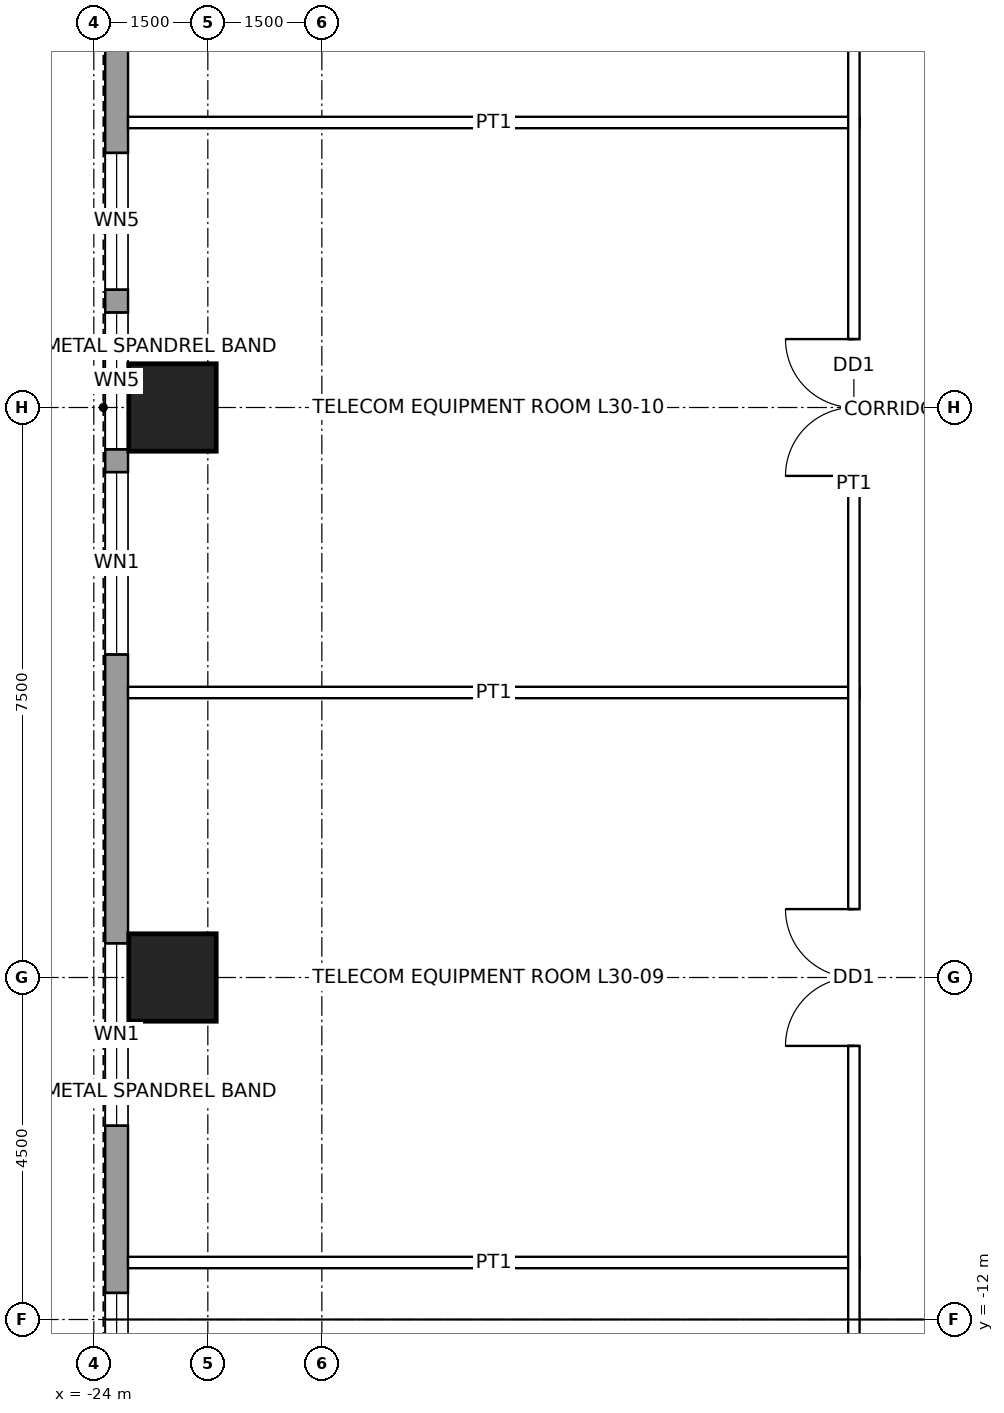
"""IFC4 building model, lengths in metres.
Left out: names, types, materials, properties, quantities, classifications, styles, units other than length and angle.
Written with IfcOpenShell. Run it as: python <this file> out.ifc"""

import sys

from ifc_helpers import new_model, si_unit, direction, frame, frame_2d, origin, origin_2d, place, context, subcontext, project, spatial, rectangle, hollow_rectangle, extrude, element, fill, save


model = new_model("IFC4")
c1 = context("Model", 3, precision=1e-05, world=origin(), true_north=direction((0.0, 1.0)))
c2 = subcontext(c1, "Body", "Model", "MODEL_VIEW")
j1 = project(units=[si_unit("LENGTHUNIT", "METRE"), si_unit("PLANEANGLEUNIT", "RADIAN")], contexts=[c1])
p1 = place(None, origin())
s1 = spatial("IfcSite", under=j1, at=p1, CompositionType="ELEMENT")
p2 = place(p1, origin())
s2 = spatial("IfcBuilding", under=s1, at=p2, CompositionType="ELEMENT")
p3 = place(p2, frame((0.0, 0.0, 149.4)))
s3 = spatial("IfcBuildingStorey", under=s2, at=p3, CompositionType="ELEMENT", Elevation=149.4)
for number, where, z_axis, x_axis in (
    (1, (-22.965, -7.5, 0.0), (0.0, 0.0, 1.0), (1.0, 0.0, 0.0)),
    (2, (-22.965, 0.0, 0.0), (0.0, 0.0, 1.0), (1.0, 0.0, 0.0)),
):
    element("IfcColumn", number, at=place(p3, frame(where, z_axis=z_axis, x_axis=x_axis)), inside=s3, PredefinedType="COLUMN", context=c2, shape_type="SweptSolid", body=[
        extrude(hollow_rectangle(XDim=1.15, YDim=1.15, WallThickness=0.075, at=origin_2d()), origin(), (0.0, 0.0, 1.0), 4.5),
    ])
p4 = place(p3, frame((-23.7, -16.2, 0.0), z_axis=(0.0, 0.0, 1.0), x_axis=(0.0, 1.0, 0.0)))
e3 = element("IfcWall", 3, at=p4, inside=s3, PredefinedType="SOLIDWALL", context=c2, shape_type="SweptSolid", body=[
    extrude(rectangle(XDim=32.4, YDim=0.3, at=frame_2d((16.2, 0.0))), origin(), (0.0, 0.0, 1.0), 4.3),
])
p5 = place(p4, frame((0.65, 0.0, 1.0)))
e4 = element("IfcOpeningElement", 4, at=p5, cuts=e3, PredefinedType="OPENING", context=c2, shape_type="SweptSolid", body=[
    extrude(rectangle(XDim=1.8, YDim=1.2, at=frame_2d((0.9, 0.6))), frame((0.0, 0.16, 0.0), z_axis=(0.0, -1.0, 0.0), x_axis=(1.0, 0.0, 0.0)), (0.0, 0.0, 1.0), 0.32),
])
p6 = place(p4, frame((2.75, 0.0, 1.0)))
e5 = element("IfcOpeningElement", 5, at=p6, cuts=e3, PredefinedType="OPENING", context=c2, shape_type="SweptSolid", body=[
    extrude(rectangle(XDim=1.8, YDim=1.2, at=frame_2d((0.9, 0.6))), frame((0.0, 0.16, 0.0), z_axis=(0.0, -1.0, 0.0), x_axis=(1.0, 0.0, 0.0)), (0.0, 0.0, 1.0), 0.32),
])
p7 = place(p4, frame((6.75, 0.0, 1.0)))
e6 = element("IfcOpeningElement", 6, at=p7, cuts=e3, PredefinedType="OPENING", context=c2, shape_type="SweptSolid", body=[
    extrude(rectangle(XDim=2.4, YDim=1.2, at=frame_2d((1.2, 0.6))), frame((0.0, 0.16, 0.0), z_axis=(0.0, -1.0, 0.0), x_axis=(1.0, 0.0, 0.0)), (0.0, 0.0, 1.0), 0.32),
])
p8 = place(p4, frame((12.95, 0.0, 1.0)))
e7 = element("IfcOpeningElement", 7, at=p8, cuts=e3, PredefinedType="OPENING", context=c2, shape_type="SweptSolid", body=[
    extrude(rectangle(XDim=2.4, YDim=1.2, at=frame_2d((1.2, 0.6))), frame((0.0, 0.16, 0.0), z_axis=(0.0, -1.0, 0.0), x_axis=(1.0, 0.0, 0.0)), (0.0, 0.0, 1.0), 0.32),
])
p9 = place(p4, frame((15.65, 0.0, 1.0)))
e8 = element("IfcOpeningElement", 8, at=p9, cuts=e3, PredefinedType="OPENING", context=c2, shape_type="SweptSolid", body=[
    extrude(rectangle(XDim=1.8, YDim=1.2, at=frame_2d((0.9, 0.6))), frame((0.0, 0.16, 0.0), z_axis=(0.0, -1.0, 0.0), x_axis=(1.0, 0.0, 0.0)), (0.0, 0.0, 1.0), 0.32),
])
p10 = place(p4, frame((17.75, 0.0, 1.0)))
e9 = element("IfcOpeningElement", 9, at=p10, cuts=e3, PredefinedType="OPENING", context=c2, shape_type="SweptSolid", body=[
    extrude(rectangle(XDim=1.8, YDim=1.2, at=frame_2d((0.9, 0.6))), frame((0.0, 0.16, 0.0), z_axis=(0.0, -1.0, 0.0), x_axis=(1.0, 0.0, 0.0)), (0.0, 0.0, 1.0), 0.32),
])
p11 = place(p4, frame((24.5, 0.0, 1.0)))
e10 = element("IfcOpeningElement", 10, at=p11, cuts=e3, PredefinedType="OPENING", context=c2, shape_type="SweptSolid", body=[
    extrude(rectangle(XDim=2.4, YDim=1.2, at=frame_2d((1.2, 0.6))), frame((0.0, 0.16, 0.0), z_axis=(0.0, -1.0, 0.0), x_axis=(1.0, 0.0, 0.0)), (0.0, 0.0, 1.0), 0.32),
])
p12 = place(p4, frame((28.0, 0.0, 1.0)))
e11 = element("IfcOpeningElement", 11, at=p12, cuts=e3, PredefinedType="OPENING", context=c2, shape_type="SweptSolid", body=[
    extrude(rectangle(XDim=2.4, YDim=1.2, at=frame_2d((1.2, 0.6))), frame((0.0, 0.16, 0.0), z_axis=(0.0, -1.0, 0.0), x_axis=(1.0, 0.0, 0.0)), (0.0, 0.0, 1.0), 0.32),
])
for number, where, z_axis, x_axis in (
    (12, (-23.55, -11.25, 0.0), (0.0, 0.0, 1.0), (1.0, 0.0, 0.0)),
    (13, (-23.55, -3.75, 0.0), (0.0, 0.0, 1.0), (1.0, 0.0, 0.0)),
    (14, (-23.55, 3.75, 0.0), (0.0, 0.0, 1.0), (1.0, 0.0, 0.0)),
):
    element("IfcWall", number, at=place(p3, frame(where, z_axis=z_axis, x_axis=x_axis)), inside=s3, PredefinedType="PARTITIONING", context=c2, shape_type="SweptSolid", body=[
        extrude(rectangle(XDim=9.625, YDim=0.15, at=frame_2d((4.812, 0.0))), origin(), (0.0, 0.0, 1.0), 3.431),
    ])
p13 = place(p3, frame((-14.0, -14.075, 0.0), z_axis=(0.0, 0.0, 1.0), x_axis=(0.0, 1.0, 0.0)))
e15 = element("IfcWall", 15, at=p13, inside=s3, PredefinedType="PARTITIONING", context=c2, shape_type="SweptSolid", body=[
    extrude(rectangle(XDim=26.15, YDim=0.15, at=frame_2d((13.075, 0.0))), origin(), (0.0, 0.0, 1.0), 4.3),
])
p14 = place(p13, frame((5.675, 0.0, 0.0)))
e16 = element("IfcOpeningElement", 16, at=p14, cuts=e15, PredefinedType="OPENING", context=c2, shape_type="SweptSolid", body=[
    extrude(rectangle(XDim=1.8, YDim=2.4, at=frame_2d((0.9, 1.2))), frame((0.0, 0.085, 0.0), z_axis=(0.0, -1.0, 0.0), x_axis=(1.0, 0.0, 0.0)), (0.0, 0.0, 1.0), 0.17),
])
p15 = place(p13, frame((13.175, 0.0, 0.0)))
e17 = element("IfcOpeningElement", 17, at=p15, cuts=e15, PredefinedType="OPENING", context=c2, shape_type="SweptSolid", body=[
    extrude(rectangle(XDim=1.8, YDim=2.4, at=frame_2d((0.9, 1.2))), frame((0.0, 0.085, 0.0), z_axis=(0.0, -1.0, 0.0), x_axis=(1.0, 0.0, 0.0)), (0.0, 0.0, 1.0), 0.17),
])
p16 = place(p13, frame((20.675, 0.0, 0.0)))
e18 = element("IfcOpeningElement", 18, at=p16, cuts=e15, PredefinedType="OPENING", context=c2, shape_type="SweptSolid", body=[
    extrude(rectangle(XDim=1.8, YDim=2.4, at=frame_2d((0.9, 1.2))), frame((0.0, 0.085, 0.0), z_axis=(0.0, -1.0, 0.0), x_axis=(1.0, 0.0, 0.0)), (0.0, 0.0, 1.0), 0.17),
])
p17 = place(p6, origin())
e19 = element("IfcWindow", 19, at=p17, inside=s3, PartitioningType="SINGLE_PANEL", PredefinedType="WINDOW", context=c2, shape_type="SweptSolid", body=[
    extrude(rectangle(XDim=1.8, YDim=1.2, at=frame_2d((0.9, 0.6))), frame((0.0, 0.03, 0.0), z_axis=(0.0, -1.0, 0.0), x_axis=(1.0, 0.0, 0.0)), (0.0, 0.0, 1.0), 0.06),
])
fill(e5, e19)
p18 = place(p7, origin())
e20 = element("IfcWindow", 20, at=p18, inside=s3, PartitioningType="SINGLE_PANEL", PredefinedType="WINDOW", context=c2, shape_type="SweptSolid", body=[
    extrude(rectangle(XDim=2.4, YDim=1.2, at=frame_2d((1.2, 0.6))), frame((0.0, 0.03, 0.0), z_axis=(0.0, -1.0, 0.0), x_axis=(1.0, 0.0, 0.0)), (0.0, 0.0, 1.0), 0.06),
])
fill(e6, e20)
p19 = place(p8, origin())
e21 = element("IfcWindow", 21, at=p19, inside=s3, PartitioningType="SINGLE_PANEL", PredefinedType="WINDOW", context=c2, shape_type="SweptSolid", body=[
    extrude(rectangle(XDim=2.4, YDim=1.2, at=frame_2d((1.2, 0.6))), frame((0.0, 0.03, 0.0), z_axis=(0.0, -1.0, 0.0), x_axis=(1.0, 0.0, 0.0)), (0.0, 0.0, 1.0), 0.06),
])
fill(e7, e21)
p20 = place(p9, origin())
e22 = element("IfcWindow", 22, at=p20, inside=s3, PartitioningType="SINGLE_PANEL", PredefinedType="WINDOW", context=c2, shape_type="SweptSolid", body=[
    extrude(rectangle(XDim=1.8, YDim=1.2, at=frame_2d((0.9, 0.6))), frame((0.0, 0.03, 0.0), z_axis=(0.0, -1.0, 0.0), x_axis=(1.0, 0.0, 0.0)), (0.0, 0.0, 1.0), 0.06),
])
fill(e8, e22)
p21 = place(p10, origin())
e23 = element("IfcWindow", 23, at=p21, inside=s3, PartitioningType="SINGLE_PANEL", PredefinedType="WINDOW", context=c2, shape_type="SweptSolid", body=[
    extrude(rectangle(XDim=1.8, YDim=1.2, at=frame_2d((0.9, 0.6))), frame((0.0, 0.03, 0.0), z_axis=(0.0, -1.0, 0.0), x_axis=(1.0, 0.0, 0.0)), (0.0, 0.0, 1.0), 0.06),
])
fill(e9, e23)
p22 = place(p14, origin())
e24 = element("IfcDoor", 24, at=p22, inside=s3, OperationType="DOUBLE_DOOR_SINGLE_SWING", PredefinedType="DOOR", context=c2, shape_type="SweptSolid", body=[
    extrude(rectangle(XDim=1.8, YDim=2.4, at=frame_2d((0.9, 1.2))), frame((0.0, 0.025, 0.0), z_axis=(0.0, -1.0, 0.0), x_axis=(1.0, 0.0, 0.0)), (0.0, 0.0, 1.0), 0.05),
])
fill(e16, e24)
p23 = place(p15, origin())
e25 = element("IfcDoor", 25, at=p23, inside=s3, OperationType="DOUBLE_DOOR_SINGLE_SWING", PredefinedType="DOOR", context=c2, shape_type="SweptSolid", body=[
    extrude(rectangle(XDim=1.8, YDim=2.4, at=frame_2d((0.9, 1.2))), frame((0.0, 0.025, 0.0), z_axis=(0.0, -1.0, 0.0), x_axis=(1.0, 0.0, 0.0)), (0.0, 0.0, 1.0), 0.05),
])
fill(e17, e25)
save(model, sys.argv[1])
